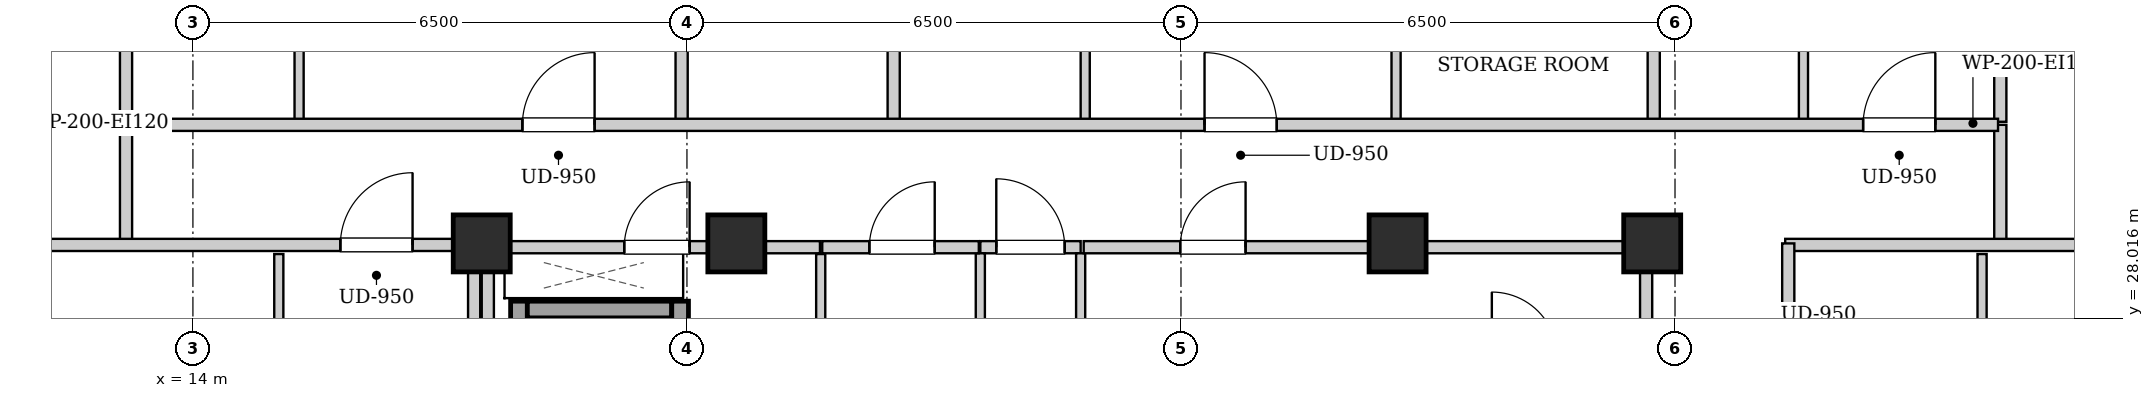
"""IFC4 building model, lengths in metres.
Left out: names, types, materials, properties, quantities, classifications, styles, units other than length and angle.
Written with IfcOpenShell. Run it as: python <this file> out.ifc"""

import sys

from ifc_helpers import new_model, si_unit, direction, frame, frame_2d, origin, origin_2d, place, context, subcontext, project, spatial, rectangle, extrude, element, fill, save


model = new_model("IFC4")
c1 = context("Model", 3, precision=1e-05, world=origin(), true_north=direction((0.0, 1.0)))
c2 = subcontext(c1, "Body", "Model", "MODEL_VIEW")
j1 = project(units=[si_unit("LENGTHUNIT", "METRE"), si_unit("PLANEANGLEUNIT", "RADIAN")], contexts=[c1])
p1 = place(None, origin())
s1 = spatial("IfcSite", under=j1, at=p1, CompositionType="ELEMENT")
p2 = place(p1, origin())
s2 = spatial("IfcBuilding", under=s1, at=p2, CompositionType="ELEMENT")
p3 = place(p2, frame((0.0, 0.0, 237.7)))
s3 = spatial("IfcBuildingStorey", under=s2, at=p3, CompositionType="ELEMENT", Elevation=237.7)
for number, where, z_axis, x_axis in (
    (1, (17.8, 29.0, 0.0), (0.0, 0.0, 1.0), (1.0, 0.0, 0.0)),
    (2, (21.15, 29.0, 0.0), (0.0, 0.0, 1.0), (1.0, 0.0, 0.0)),
    (3, (29.85, 29.0, 0.0), (0.0, 0.0, 1.0), (1.0, 0.0, 0.0)),
    (4, (33.2, 29.0, 0.0), (0.0, 0.0, 1.0), (1.0, 0.0, 0.0)),
):
    element("IfcColumn", number, at=place(p3, frame(where, z_axis=z_axis, x_axis=x_axis)), inside=s3, PredefinedType="COLUMN", context=c2, shape_type="SweptSolid", body=[
        extrude(rectangle(XDim=0.75, YDim=0.75, at=origin_2d()), origin(), (0.0, 0.0, 1.0), 3.4),
    ])
p4 = place(p3, frame((18.29, 24.1, 0.0), z_axis=(0.0, 0.0, 1.0), x_axis=(0.0, 1.0, 0.0)))
e5 = element("IfcWall", 5, at=p4, inside=s3, PredefinedType="SHEAR", context=c2, shape_type="SweptSolid", body=[
    extrude(rectangle(XDim=4.14, YDim=0.22, at=frame_2d((2.07, 0.0))), origin(), (0.0, 0.0, 1.0), 3.14),
])
p5 = place(p3, frame((18.4, 28.13, 0.0), z_axis=(0.0, 0.0, 1.0), x_axis=(1.0, 0.0, 0.0)))
e6 = element("IfcWall", 6, at=p5, inside=s3, PredefinedType="SHEAR", context=c2, shape_type="SweptSolid", body=[
    extrude(rectangle(XDim=1.9, YDim=0.22, at=frame_2d((0.95, 0.0))), origin(), (0.0, 0.0, 1.0), 3.14),
])
p6 = place(p3, frame((20.41, 26.06, 0.0), z_axis=(0.0, 0.0, 1.0), x_axis=(0.0, 1.0, 0.0)))
e7 = element("IfcWall", 7, at=p6, inside=s3, PredefinedType="SHEAR", context=c2, shape_type="SweptSolid", body=[
    extrude(rectangle(XDim=2.18, YDim=0.22, at=frame_2d((1.09, 0.0))), origin(), (0.0, 0.0, 1.0), 3.14),
])
p7 = place(p6, frame((0.54, 0.0, 0.0)))
e8 = element("IfcOpeningElement", 8, at=p7, cuts=e7, PredefinedType="OPENING", context=c2, shape_type="SweptSolid", body=[
    extrude(rectangle(XDim=1.1, YDim=2.15, at=frame_2d((0.55, 1.075))), frame((0.0, 0.12, 0.0), z_axis=(0.0, -1.0, 0.0), x_axis=(1.0, 0.0, 0.0)), (0.0, 0.0, 1.0), 0.24),
])
for number, where, z_axis, x_axis in (
    (9, (17.88, 24.12, 0.0), (0.0, 0.0, 1.0), (0.0, 1.0, 0.0)),
    (10, (33.12, 24.12, 0.0), (0.0, 0.0, 1.0), (0.0, 1.0, 0.0)),
):
    element("IfcWall", number, at=place(p3, frame(where, z_axis=z_axis, x_axis=x_axis)), inside=s3, PredefinedType="PARTITIONING", context=c2, shape_type="SweptSolid", body=[
        extrude(rectangle(XDim=4.76, YDim=0.16, at=frame_2d((2.38, 0.0))), origin(), (0.0, 0.0, 1.0), 2.475),
    ])
p8 = place(p3, frame((24.36, 28.95, 0.0), z_axis=(0.0, 0.0, 1.0), x_axis=(1.0, 0.0, 0.0)))
e11 = element("IfcWall", 11, at=p8, inside=s3, PredefinedType="PARTITIONING", context=c2, shape_type="SweptSolid", body=[
    extrude(rectangle(XDim=1.32, YDim=0.16, at=frame_2d((0.66, 0.0))), origin(), (0.0, 0.0, 1.0), 2.668),
])
p9 = place(p8, frame((0.21, 0.0, 0.0)))
e12 = element("IfcOpeningElement", 12, at=p9, cuts=e11, PredefinedType="OPENING", context=c2, shape_type="SweptSolid", body=[
    extrude(rectangle(XDim=0.9, YDim=2.05, at=frame_2d((0.45, 1.025))), frame((0.0, 0.09, 0.0), z_axis=(0.0, -1.0, 0.0), x_axis=(1.0, 0.0, 0.0)), (0.0, 0.0, 1.0), 0.18),
])
p10 = place(p3, frame((17.96, 28.95, 0.0), z_axis=(0.0, 0.0, 1.0), x_axis=(1.0, 0.0, 0.0)))
e13 = element("IfcWall", 13, at=p10, inside=s3, PredefinedType="PARTITIONING", context=c2, shape_type="SweptSolid", body=[
    extrude(rectangle(XDim=4.29, YDim=0.16, at=frame_2d((2.145, 0.0))), origin(), (0.0, 0.0, 1.0), 2.668),
])
p11 = place(p10, frame((1.715, 0.0, 0.0)))
e14 = element("IfcOpeningElement", 14, at=p11, cuts=e13, PredefinedType="OPENING", context=c2, shape_type="SweptSolid", body=[
    extrude(rectangle(XDim=0.86, YDim=2.05, at=frame_2d((0.43, 1.025))), frame((0.0, 0.09, 0.0), z_axis=(0.0, -1.0, 0.0), x_axis=(1.0, 0.0, 0.0)), (0.0, 0.0, 1.0), 0.18),
])
for number, where, z_axis, x_axis in (
    (15, (24.36, 25.0, 0.0), (0.0, 0.0, 1.0), (0.0, 1.0, 0.0)),
    (16, (25.68, 25.0, 0.0), (0.0, 0.0, 1.0), (0.0, 1.0, 0.0)),
):
    element("IfcWall", number, at=place(p3, frame(where, z_axis=z_axis, x_axis=x_axis)), inside=s3, PredefinedType="PARTITIONING", context=c2, shape_type="SweptSolid", body=[
        extrude(rectangle(XDim=3.87, YDim=0.12, at=frame_2d((1.935, 0.0))), origin(), (0.0, 0.0, 1.0), 3.14),
    ])
p12 = place(p3, frame((22.26, 25.0, 0.0), z_axis=(0.0, 0.0, 1.0), x_axis=(0.0, 1.0, 0.0)))
e17 = element("IfcWall", 17, at=p12, inside=s3, PredefinedType="PARTITIONING", context=c2, shape_type="SweptSolid", body=[
    extrude(rectangle(XDim=3.86, YDim=0.12, at=frame_2d((1.93, 0.0))), origin(), (0.0, 0.0, 1.0), 3.14),
])
p13 = place(p3, frame((22.28, 28.95, 0.0), z_axis=(0.0, 0.0, 1.0), x_axis=(1.0, 0.0, 0.0)))
e18 = element("IfcWall", 18, at=p13, inside=s3, PredefinedType="PARTITIONING", context=c2, shape_type="SweptSolid", body=[
    extrude(rectangle(XDim=2.06, YDim=0.16, at=frame_2d((1.03, 0.0))), origin(), (0.0, 0.0, 1.0), 2.668),
])
p14 = place(p13, frame((0.62, 0.0, 0.0)))
e19 = element("IfcOpeningElement", 19, at=p14, cuts=e18, PredefinedType="OPENING", context=c2, shape_type="SweptSolid", body=[
    extrude(rectangle(XDim=0.86, YDim=2.05, at=frame_2d((0.43, 1.025))), frame((0.0, 0.09, 0.0), z_axis=(0.0, -1.0, 0.0), x_axis=(1.0, 0.0, 0.0)), (0.0, 0.0, 1.0), 0.18),
])
p15 = place(p3, frame((25.72, 28.95, 0.0), z_axis=(0.0, 0.0, 1.0), x_axis=(1.0, 0.0, 0.0)))
e20 = element("IfcWall", 20, at=p15, inside=s3, PredefinedType="PARTITIONING", context=c2, shape_type="SweptSolid", body=[
    extrude(rectangle(XDim=7.32, YDim=0.16, at=frame_2d((3.66, 0.0))), origin(), (0.0, 0.0, 1.0), 2.668),
])
p16 = place(p15, frame((1.27, 0.0, 0.0)))
e21 = element("IfcOpeningElement", 21, at=p16, cuts=e20, PredefinedType="OPENING", context=c2, shape_type="SweptSolid", body=[
    extrude(rectangle(XDim=0.86, YDim=2.05, at=frame_2d((0.43, 1.025))), frame((0.0, 0.09, 0.0), z_axis=(0.0, -1.0, 0.0), x_axis=(1.0, 0.0, 0.0)), (0.0, 0.0, 1.0), 0.18),
])
for number, where, z_axis, x_axis in (
    (22, (13.12, 28.98, 0.0), (0.0, 0.0, 1.0), (0.0, 1.0, 0.0)),
    (23, (37.78, 28.98, 0.0), (0.0, 0.0, 1.0), (0.0, 1.0, 0.0)),
):
    element("IfcWall", number, at=place(p3, frame(where, z_axis=z_axis, x_axis=x_axis)), inside=s3, PredefinedType="PARTITIONING", context=c2, shape_type="SweptSolid", body=[
        extrude(rectangle(XDim=1.58, YDim=0.16, at=frame_2d((0.79, 0.0))), origin(), (0.0, 0.0, 1.0), 3.14),
    ])
p17 = place(p3, frame((34.95, 28.98, 0.0), z_axis=(0.0, 0.0, 1.0), x_axis=(1.0, 0.0, 0.0)))
e24 = element("IfcWall", 24, at=p17, inside=s3, PredefinedType="PARTITIONING", context=c2, shape_type="SweptSolid", body=[
    extrude(rectangle(XDim=5.07, YDim=0.16, at=frame_2d((2.535, 0.0))), origin(), (0.0, 0.0, 1.0), 2.668),
])
p18 = place(p3, frame((13.12, 30.6, 0.0), z_axis=(0.0, 0.0, 1.0), x_axis=(0.0, 1.0, 0.0)))
e25 = element("IfcWall", 25, at=p18, inside=s3, PredefinedType="PARTITIONING", context=c2, shape_type="SweptSolid", body=[
    extrude(rectangle(XDim=2.91, YDim=0.16, at=frame_2d((1.455, 0.0))), origin(), (0.0, 0.0, 1.0), 3.14),
])
p19 = place(p3, frame((20.43, 30.6, 0.0), z_axis=(0.0, 0.0, 1.0), x_axis=(0.0, 1.0, 0.0)))
e26 = element("IfcWall", 26, at=p19, inside=s3, PredefinedType="PARTITIONING", context=c2, shape_type="SweptSolid", body=[
    extrude(rectangle(XDim=9.32, YDim=0.16, at=frame_2d((4.66, 0.0))), origin(), (0.0, 0.0, 1.0), 3.14),
])
p20 = place(p3, frame((15.397, 30.6, 0.0), z_axis=(0.0, 0.0, 1.0), x_axis=(0.0, 1.0, 0.0)))
e27 = element("IfcWall", 27, at=p20, inside=s3, PredefinedType="PARTITIONING", context=c2, shape_type="SweptSolid", body=[
    extrude(rectangle(XDim=2.85, YDim=0.12, at=frame_2d((1.425, 0.0))), origin(), (0.0, 0.0, 1.0), 3.14),
])
p21 = place(p20, frame((0.995, 0.0, 0.0)))
e28 = element("IfcOpeningElement", 28, at=p21, cuts=e27, PredefinedType="OPENING", context=c2, shape_type="SweptSolid", body=[
    extrude(rectangle(XDim=0.86, YDim=2.05, at=frame_2d((0.43, 1.025))), frame((0.0, 0.07, 0.0), z_axis=(0.0, -1.0, 0.0), x_axis=(1.0, 0.0, 0.0)), (0.0, 0.0, 1.0), 0.14),
])
p22 = place(p3, frame((23.22, 30.6, 0.0), z_axis=(0.0, 0.0, 1.0), x_axis=(0.0, 1.0, 0.0)))
e29 = element("IfcWall", 29, at=p22, inside=s3, PredefinedType="PARTITIONING", context=c2, shape_type="SweptSolid", body=[
    extrude(rectangle(XDim=9.32, YDim=0.16, at=frame_2d((4.66, 0.0))), origin(), (0.0, 0.0, 1.0), 3.14),
])
p23 = place(p3, frame((25.74, 30.6, 0.0), z_axis=(0.0, 0.0, 1.0), x_axis=(0.0, 1.0, 0.0)))
e30 = element("IfcWall", 30, at=p23, inside=s3, PredefinedType="PARTITIONING", context=c2, shape_type="SweptSolid", body=[
    extrude(rectangle(XDim=2.85, YDim=0.12, at=frame_2d((1.425, 0.0))), origin(), (0.0, 0.0, 1.0), 3.14),
])
p24 = place(p23, frame((0.995, 0.0, 0.0)))
e31 = element("IfcOpeningElement", 31, at=p24, cuts=e30, PredefinedType="OPENING", context=c2, shape_type="SweptSolid", body=[
    extrude(rectangle(XDim=0.86, YDim=2.05, at=frame_2d((0.43, 1.025))), frame((0.0, 0.07, 0.0), z_axis=(0.0, -1.0, 0.0), x_axis=(1.0, 0.0, 0.0)), (0.0, 0.0, 1.0), 0.14),
])
p25 = place(p3, frame((29.83, 30.6, 0.0), z_axis=(0.0, 0.0, 1.0), x_axis=(0.0, 1.0, 0.0)))
e32 = element("IfcWall", 32, at=p25, inside=s3, PredefinedType="PARTITIONING", context=c2, shape_type="SweptSolid", body=[
    extrude(rectangle(XDim=2.85, YDim=0.12, at=frame_2d((1.425, 0.0))), origin(), (0.0, 0.0, 1.0), 3.14),
])
p26 = place(p25, frame((0.975, 0.0, 0.0)))
e33 = element("IfcOpeningElement", 33, at=p26, cuts=e32, PredefinedType="OPENING", context=c2, shape_type="SweptSolid", body=[
    extrude(rectangle(XDim=0.9, YDim=2.05, at=frame_2d((0.45, 1.025))), frame((0.0, 0.07, 0.0), z_axis=(0.0, -1.0, 0.0), x_axis=(1.0, 0.0, 0.0)), (0.0, 0.0, 1.0), 0.14),
])
p27 = place(p3, frame((37.78, 30.6, 0.0), z_axis=(0.0, 0.0, 1.0), x_axis=(0.0, 1.0, 0.0)))
e34 = element("IfcWall", 34, at=p27, inside=s3, PredefinedType="PARTITIONING", context=c2, shape_type="SweptSolid", body=[
    extrude(rectangle(XDim=2.91, YDim=0.16, at=frame_2d((1.455, 0.0))), origin(), (0.0, 0.0, 1.0), 3.14),
])
p28 = place(p3, frame((33.22, 30.6, 0.0), z_axis=(0.0, 0.0, 1.0), x_axis=(0.0, 1.0, 0.0)))
e35 = element("IfcWall", 35, at=p28, inside=s3, PredefinedType="PARTITIONING", context=c2, shape_type="SweptSolid", body=[
    extrude(rectangle(XDim=7.34, YDim=0.16, at=frame_2d((3.67, 0.0))), origin(), (0.0, 0.0, 1.0), 2.668),
])
p29 = place(p3, frame((35.19, 30.6, 0.0), z_axis=(0.0, 0.0, 1.0), x_axis=(0.0, 1.0, 0.0)))
e36 = element("IfcWall", 36, at=p29, inside=s3, PredefinedType="PARTITIONING", context=c2, shape_type="SweptSolid", body=[
    extrude(rectangle(XDim=2.85, YDim=0.12, at=frame_2d((1.425, 0.0))), origin(), (0.0, 0.0, 1.0), 3.14),
])
p30 = place(p29, frame((0.995, 0.0, 0.0)))
e37 = element("IfcOpeningElement", 37, at=p30, cuts=e36, PredefinedType="OPENING", context=c2, shape_type="SweptSolid", body=[
    extrude(rectangle(XDim=0.86, YDim=2.05, at=frame_2d((0.43, 1.025))), frame((0.0, 0.07, 0.0), z_axis=(0.0, -1.0, 0.0), x_axis=(1.0, 0.0, 0.0)), (0.0, 0.0, 1.0), 0.14),
])
p31 = place(p3, frame((10.88, 28.98, 0.0), z_axis=(0.0, 0.0, 1.0), x_axis=(1.0, 0.0, 0.0)))
e38 = element("IfcWall", 38, at=p31, inside=s3, PredefinedType="PARTITIONING", context=c2, shape_type="SweptSolid", body=[
    extrude(rectangle(XDim=6.88, YDim=0.16, at=frame_2d((3.44, 0.0))), origin(), (0.0, 0.0, 1.0), 2.668),
])
p32 = place(p31, frame((5.06, 0.0, 0.0)))
e39 = element("IfcOpeningElement", 39, at=p32, cuts=e38, PredefinedType="OPENING", context=c2, shape_type="SweptSolid", body=[
    extrude(rectangle(XDim=0.95, YDim=2.1, at=frame_2d((0.475, 1.05))), frame((0.0, 0.09, 0.0), z_axis=(0.0, -1.0, 0.0), x_axis=(1.0, 0.0, 0.0)), (0.0, 0.0, 1.0), 0.18),
])
p33 = place(p3, frame((15.13, 25.052, 0.0), z_axis=(0.0, 0.0, 1.0), x_axis=(0.0, 1.0, 0.0)))
e40 = element("IfcWall", 40, at=p33, inside=s3, PredefinedType="PARTITIONING", context=c2, shape_type="SweptSolid", body=[
    extrude(rectangle(XDim=3.808, YDim=0.12, at=frame_2d((1.904, 0.0))), origin(), (0.0, 0.0, 1.0), 3.14),
])
p34 = place(p33, frame((1.454, 0.0, 0.0)))
e41 = element("IfcOpeningElement", 41, at=p34, cuts=e40, PredefinedType="OPENING", context=c2, shape_type="SweptSolid", body=[
    extrude(rectangle(XDim=0.9, YDim=2.05, at=frame_2d((0.45, 1.025))), frame((0.0, 0.07, 0.0), z_axis=(0.0, -1.0, 0.0), x_axis=(1.0, 0.0, 0.0)), (0.0, 0.0, 1.0), 0.14),
])
p35 = place(p3, frame((37.54, 25.052, 0.0), z_axis=(0.0, 0.0, 1.0), x_axis=(0.0, 1.0, 0.0)))
e42 = element("IfcWall", 42, at=p35, inside=s3, PredefinedType="PARTITIONING", context=c2, shape_type="SweptSolid", body=[
    extrude(rectangle(XDim=3.808, YDim=0.12, at=frame_2d((1.904, 0.0))), origin(), (0.0, 0.0, 1.0), 3.14),
])
p36 = place(p35, frame((1.454, 0.0, 0.0)))
e43 = element("IfcOpeningElement", 43, at=p36, cuts=e42, PredefinedType="OPENING", context=c2, shape_type="SweptSolid", body=[
    extrude(rectangle(XDim=0.9, YDim=2.05, at=frame_2d((0.45, 1.025))), frame((0.0, 0.07, 0.0), z_axis=(0.0, -1.0, 0.0), x_axis=(1.0, 0.0, 0.0)), (0.0, 0.0, 1.0), 0.14),
])
p37 = place(p3, frame((13.15, 30.56, 0.0), z_axis=(0.0, 0.0, 1.0), x_axis=(1.0, 0.0, 0.0)))
e44 = element("IfcWall", 44, at=p37, inside=s3, PredefinedType="PARTITIONING", context=c2, shape_type="SweptSolid", body=[
    extrude(rectangle(XDim=24.6, YDim=0.16, at=frame_2d((12.3, 0.0))), origin(), (0.0, 0.0, 1.0), 3.14),
])
p38 = place(p37, frame((5.185, 0.0, 0.0)))
e45 = element("IfcOpeningElement", 45, at=p38, cuts=e44, PredefinedType="OPENING", context=c2, shape_type="SweptSolid", body=[
    extrude(rectangle(XDim=0.95, YDim=2.1, at=frame_2d((0.475, 1.05))), frame((0.0, 0.09, 0.0), z_axis=(0.0, -1.0, 0.0), x_axis=(1.0, 0.0, 0.0)), (0.0, 0.0, 1.0), 0.18),
])
p39 = place(p37, frame((14.16, 0.0, 0.0)))
e46 = element("IfcOpeningElement", 46, at=p39, cuts=e44, PredefinedType="OPENING", context=c2, shape_type="SweptSolid", body=[
    extrude(rectangle(XDim=0.95, YDim=2.1, at=frame_2d((0.475, 1.05))), frame((0.0, 0.09, 0.0), z_axis=(0.0, -1.0, 0.0), x_axis=(1.0, 0.0, 0.0)), (0.0, 0.0, 1.0), 0.18),
])
p40 = place(p37, frame((22.825, 0.0, 0.0)))
e47 = element("IfcOpeningElement", 47, at=p40, cuts=e44, PredefinedType="OPENING", context=c2, shape_type="SweptSolid", body=[
    extrude(rectangle(XDim=0.95, YDim=2.1, at=frame_2d((0.475, 1.05))), frame((0.0, 0.09, 0.0), z_axis=(0.0, -1.0, 0.0), x_axis=(1.0, 0.0, 0.0)), (0.0, 0.0, 1.0), 0.18),
])
p41 = place(p3, frame((17.7, 15.02, 0.0), z_axis=(0.0, 0.0, 1.0), x_axis=(0.0, 1.0, 0.0)))
e48 = element("IfcWall", 48, at=p41, inside=s3, PredefinedType="PARTITIONING", context=c2, shape_type="SweptSolid", body=[
    extrude(rectangle(XDim=13.98, YDim=0.16, at=frame_2d((6.99, 0.0))), origin(), (0.0, 0.0, 1.0), 2.475),
])
p42 = place(p3, frame((34.99, 15.07, 0.0), z_axis=(0.0, 0.0, 1.0), x_axis=(0.0, 1.0, 0.0)))
e49 = element("IfcWall", 49, at=p42, inside=s3, PredefinedType="PARTITIONING", context=c2, shape_type="SweptSolid", body=[
    extrude(rectangle(XDim=13.93, YDim=0.16, at=frame_2d((6.965, 0.0))), origin(), (0.0, 0.0, 1.0), 3.14),
])
p43 = place(p42, frame((4.661, 0.0, 0.0)))
e50 = element("IfcOpeningElement", 50, at=p43, cuts=e49, PredefinedType="OPENING", context=c2, shape_type="SweptSolid", body=[
    extrude(rectangle(XDim=0.95, YDim=2.1, at=frame_2d((0.475, 1.05))), frame((0.0, 0.09, 0.0), z_axis=(0.0, -1.0, 0.0), x_axis=(1.0, 0.0, 0.0)), (0.0, 0.0, 1.0), 0.18),
])
p44 = place(p42, frame((11.411, 0.0, 0.0)))
e51 = element("IfcOpeningElement", 51, at=p44, cuts=e49, PredefinedType="OPENING", context=c2, shape_type="SweptSolid", body=[
    extrude(rectangle(XDim=0.95, YDim=2.1, at=frame_2d((0.475, 1.05))), frame((0.0, 0.09, 0.0), z_axis=(0.0, -1.0, 0.0), x_axis=(1.0, 0.0, 0.0)), (0.0, 0.0, 1.0), 0.18),
])
p45 = place(p9, origin())
e52 = element("IfcDoor", 52, at=p45, inside=s3, OperationType="SINGLE_SWING_LEFT", PredefinedType="DOOR", context=c2, shape_type="SweptSolid", body=[
    extrude(rectangle(XDim=0.9, YDim=2.05, at=frame_2d((0.45, 1.025))), frame((0.0, 0.025, 0.0), z_axis=(0.0, -1.0, 0.0), x_axis=(1.0, 0.0, 0.0)), (0.0, 0.0, 1.0), 0.05),
])
fill(e12, e52)
p46 = place(p11, origin())
e53 = element("IfcDoor", 53, at=p46, inside=s3, OperationType="SINGLE_SWING_RIGHT", PredefinedType="DOOR", context=c2, shape_type="SweptSolid", body=[
    extrude(rectangle(XDim=0.86, YDim=2.05, at=frame_2d((0.43, 1.025))), frame((0.0, 0.025, 0.0), z_axis=(0.0, -1.0, 0.0), x_axis=(1.0, 0.0, 0.0)), (0.0, 0.0, 1.0), 0.05),
])
fill(e14, e53)
p47 = place(p14, origin())
e54 = element("IfcDoor", 54, at=p47, inside=s3, OperationType="SINGLE_SWING_RIGHT", PredefinedType="DOOR", context=c2, shape_type="SweptSolid", body=[
    extrude(rectangle(XDim=0.86, YDim=2.05, at=frame_2d((0.43, 1.025))), frame((0.0, 0.025, 0.0), z_axis=(0.0, -1.0, 0.0), x_axis=(1.0, 0.0, 0.0)), (0.0, 0.0, 1.0), 0.05),
])
fill(e19, e54)
p48 = place(p16, origin())
e55 = element("IfcDoor", 55, at=p48, inside=s3, OperationType="SINGLE_SWING_RIGHT", PredefinedType="DOOR", context=c2, shape_type="SweptSolid", body=[
    extrude(rectangle(XDim=0.86, YDim=2.05, at=frame_2d((0.43, 1.025))), frame((0.0, 0.025, 0.0), z_axis=(0.0, -1.0, 0.0), x_axis=(1.0, 0.0, 0.0)), (0.0, 0.0, 1.0), 0.05),
])
fill(e21, e55)
p49 = place(p32, origin())
e56 = element("IfcDoor", 56, at=p49, inside=s3, OperationType="SINGLE_SWING_RIGHT", PredefinedType="DOOR", context=c2, shape_type="SweptSolid", body=[
    extrude(rectangle(XDim=0.95, YDim=2.1, at=frame_2d((0.475, 1.05))), frame((0.0, 0.025, 0.0), z_axis=(0.0, -1.0, 0.0), x_axis=(1.0, 0.0, 0.0)), (0.0, 0.0, 1.0), 0.05),
])
fill(e39, e56)
p50 = place(p38, origin())
e57 = element("IfcDoor", 57, at=p50, inside=s3, OperationType="SINGLE_SWING_RIGHT", PredefinedType="DOOR", context=c2, shape_type="SweptSolid", body=[
    extrude(rectangle(XDim=0.95, YDim=2.1, at=frame_2d((0.475, 1.05))), frame((0.0, 0.025, 0.0), z_axis=(0.0, -1.0, 0.0), x_axis=(1.0, 0.0, 0.0)), (0.0, 0.0, 1.0), 0.05),
])
fill(e45, e57)
p51 = place(p39, origin())
e58 = element("IfcDoor", 58, at=p51, inside=s3, OperationType="SINGLE_SWING_LEFT", PredefinedType="DOOR", context=c2, shape_type="SweptSolid", body=[
    extrude(rectangle(XDim=0.95, YDim=2.1, at=frame_2d((0.475, 1.05))), frame((0.0, 0.025, 0.0), z_axis=(0.0, -1.0, 0.0), x_axis=(1.0, 0.0, 0.0)), (0.0, 0.0, 1.0), 0.05),
])
fill(e46, e58)
p52 = place(p40, origin())
e59 = element("IfcDoor", 59, at=p52, inside=s3, OperationType="SINGLE_SWING_RIGHT", PredefinedType="DOOR", context=c2, shape_type="SweptSolid", body=[
    extrude(rectangle(XDim=0.95, YDim=2.1, at=frame_2d((0.475, 1.05))), frame((0.0, 0.025, 0.0), z_axis=(0.0, -1.0, 0.0), x_axis=(1.0, 0.0, 0.0)), (0.0, 0.0, 1.0), 0.05),
])
fill(e47, e59)
save(model, sys.argv[1])
